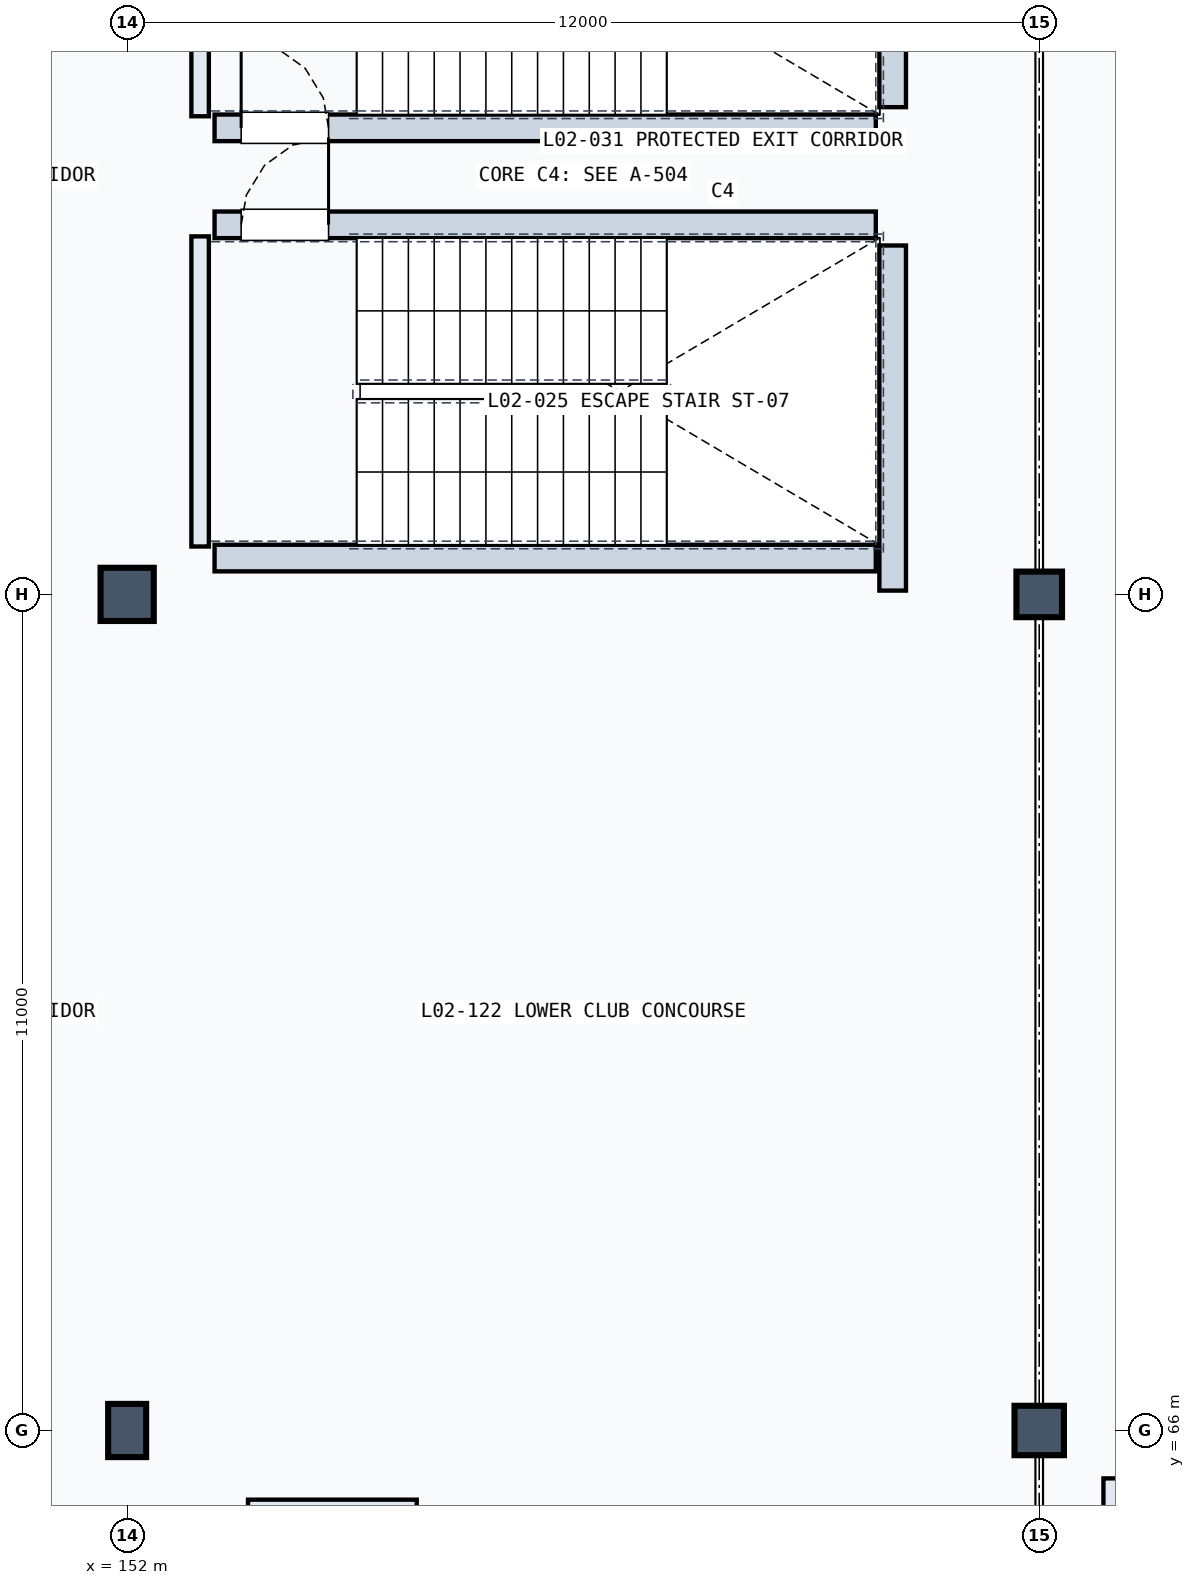
"""IFC4 building model, lengths in metres.
Left out: names, types, materials, properties, quantities, classifications, styles, units other than length and angle.
Written with IfcOpenShell. Run it as: python <this file> out.ifc"""

import sys

from ifc_helpers import new_model, si_unit, direction, frame, frame_2d, origin, origin_2d, place, context, subcontext, project, spatial, rectangle, extrude, element, fill, save


model = new_model("IFC4")
c1 = context("Model", 3, precision=1e-05, world=origin(), true_north=direction((0.0, 1.0)))
c2 = subcontext(c1, "Body", "Model", "MODEL_VIEW")
j1 = project(units=[si_unit("LENGTHUNIT", "METRE"), si_unit("PLANEANGLEUNIT", "RADIAN")], contexts=[c1])
p1 = place(None, origin())
s1 = spatial("IfcSite", under=j1, at=p1, CompositionType="ELEMENT")
p2 = place(p1, origin())
s2 = spatial("IfcBuilding", under=s1, at=p2, CompositionType="ELEMENT")
p3 = place(p2, frame((0.0, 0.0, 10.2)))
s3 = spatial("IfcBuildingStorey", under=s2, at=p3, CompositionType="ELEMENT", Elevation=10.2)
p4 = place(p3, frame((152.0, 66.0, 0.0), z_axis=(0.0, 0.0, 1.0), x_axis=(1.0, 0.0, 0.0)))
e1 = element("IfcColumn", 1, at=p4, inside=s3, PredefinedType="COLUMN", context=c2, shape_type="SweptSolid", body=[
    extrude(rectangle(XDim=0.5, YDim=0.7, at=origin_2d()), origin(), (0.0, 0.0, 1.0), 4.5),
])
p5 = place(p3, frame((152.0, 77.0, 0.0), z_axis=(0.0, 0.0, 1.0), x_axis=(1.0, 0.0, 0.0)))
e2 = element("IfcColumn", 2, at=p5, inside=s3, PredefinedType="COLUMN", context=c2, shape_type="SweptSolid", body=[
    extrude(rectangle(XDim=0.7, YDim=0.7, at=origin_2d()), origin(), (0.0, 0.0, 1.0), 4.5),
])
p6 = place(p3, frame((164.0, 66.0, 0.0), z_axis=(0.0, 0.0, 1.0), x_axis=(1.0, 0.0, 0.0)))
e3 = element("IfcColumn", 3, at=p6, inside=s3, PredefinedType="COLUMN", context=c2, shape_type="SweptSolid", body=[
    extrude(rectangle(XDim=0.65, YDim=0.65, at=origin_2d()), origin(), (0.0, 0.0, 1.0), 4.5),
])
p7 = place(p3, frame((164.0, 77.0, 0.0), z_axis=(0.0, 0.0, 1.0), x_axis=(1.0, 0.0, 0.0)))
e4 = element("IfcColumn", 4, at=p7, inside=s3, PredefinedType="COLUMN", context=c2, shape_type="SweptSolid", body=[
    extrude(rectangle(XDim=0.6, YDim=0.6, at=origin_2d()), origin(), (0.0, 0.0, 1.0), 4.5),
])
p8 = place(p3, frame((152.96, 77.63, 0.0), z_axis=(0.0, 0.0, 1.0), x_axis=(0.0, 1.0, 0.0)))
e5 = element("IfcWall", 5, at=p8, inside=s3, PredefinedType="SOLIDWALL", context=c2, shape_type="SweptSolid", body=[
    extrude(rectangle(XDim=4.08, YDim=0.23, at=frame_2d((2.04, 0.0))), origin(), (0.0, 0.0, 1.0), 4.14),
])
p9 = place(p3, frame((162.072, 77.05, 0.0), z_axis=(0.0, 0.0, 1.0), x_axis=(0.0, 1.0, 0.0)))
e6 = element("IfcWall", 6, at=p9, inside=s3, PredefinedType="SOLIDWALL", context=c2, shape_type="SweptSolid", body=[
    extrude(rectangle(XDim=4.54, YDim=0.35, at=frame_2d((2.27, 0.0))), origin(), (0.0, 0.0, 1.0), 4.14),
])
p10 = place(p3, frame((153.15, 77.478, 0.0), z_axis=(0.0, 0.0, 1.0), x_axis=(1.0, 0.0, 0.0)))
e7 = element("IfcWall", 7, at=p10, inside=s3, PredefinedType="SOLIDWALL", context=c2, shape_type="SweptSolid", body=[
    extrude(rectangle(XDim=8.7, YDim=0.35, at=frame_2d((4.35, 0.0))), origin(), (0.0, 0.0, 1.0), 4.14),
])
p11 = place(p3, frame((153.15, 81.862, 0.0), z_axis=(0.0, 0.0, 1.0), x_axis=(1.0, 0.0, 0.0)))
e8 = element("IfcWall", 8, at=p11, inside=s3, PredefinedType="SOLIDWALL", context=c2, shape_type="SweptSolid", body=[
    extrude(rectangle(XDim=8.7, YDim=0.35, at=frame_2d((4.35, 0.0))), origin(), (0.0, 0.0, 1.0), 4.14),
])
p12 = place(p11, frame((0.35, 0.0, 0.0)))
e9 = element("IfcOpeningElement", 9, at=p12, cuts=e8, PredefinedType="OPENING", context=c2, shape_type="SweptSolid", body=[
    extrude(rectangle(XDim=1.15, YDim=2.2, at=frame_2d((0.575, 1.1))), frame((0.0, 0.185, 0.0), z_axis=(0.0, -1.0, 0.0), x_axis=(1.0, 0.0, 0.0)), (0.0, 0.0, 1.0), 0.37),
])
p13 = place(p3, frame((152.96, 83.29, 0.0), z_axis=(0.0, 0.0, 1.0), x_axis=(0.0, 1.0, 0.0)))
e10 = element("IfcWall", 10, at=p13, inside=s3, PredefinedType="SOLIDWALL", context=c2, shape_type="SweptSolid", body=[
    extrude(rectangle(XDim=4.08, YDim=0.23, at=frame_2d((2.04, 0.0))), origin(), (0.0, 0.0, 1.0), 4.14),
])
p14 = place(p3, frame((162.072, 83.41, 0.0), z_axis=(0.0, 0.0, 1.0), x_axis=(0.0, 1.0, 0.0)))
e11 = element("IfcWall", 11, at=p14, inside=s3, PredefinedType="SOLIDWALL", context=c2, shape_type="SweptSolid", body=[
    extrude(rectangle(XDim=3.84, YDim=0.35, at=frame_2d((1.92, 0.0))), origin(), (0.0, 0.0, 1.0), 4.14),
])
p15 = place(p3, frame((153.15, 83.138, 0.0), z_axis=(0.0, 0.0, 1.0), x_axis=(1.0, 0.0, 0.0)))
e12 = element("IfcWall", 12, at=p15, inside=s3, PredefinedType="SOLIDWALL", context=c2, shape_type="SweptSolid", body=[
    extrude(rectangle(XDim=8.7, YDim=0.35, at=frame_2d((4.35, 0.0))), origin(), (0.0, 0.0, 1.0), 4.14),
])
p16 = place(p15, frame((0.35, 0.0, 0.0)))
e13 = element("IfcOpeningElement", 13, at=p16, cuts=e12, PredefinedType="OPENING", context=c2, shape_type="SweptSolid", body=[
    extrude(rectangle(XDim=1.15, YDim=2.2, at=frame_2d((0.575, 1.1))), frame((0.0, 0.185, 0.0), z_axis=(0.0, -1.0, 0.0), x_axis=(1.0, 0.0, 0.0)), (0.0, 0.0, 1.0), 0.37),
])
p17 = place(p3, frame((153.59, 64.96, 0.0), z_axis=(0.0, 0.0, 1.0), x_axis=(1.0, 0.0, 0.0)))
e14 = element("IfcWall", 14, at=p17, inside=s3, PredefinedType="SOLIDWALL", context=c2, shape_type="SweptSolid", body=[
    extrude(rectangle(XDim=2.22, YDim=0.26, at=frame_2d((1.11, 0.0))), origin(), (0.0, 0.0, 1.0), 4.14),
])
p18 = place(p3, frame((164.96, 61.29, 0.0), z_axis=(0.0, 0.0, 1.0), x_axis=(0.0, 1.0, 0.0)))
e15 = element("IfcWall", 15, at=p18, inside=s3, PredefinedType="SOLIDWALL", context=c2, shape_type="SweptSolid", body=[
    extrude(rectangle(XDim=4.08, YDim=0.23, at=frame_2d((2.04, 0.0))), origin(), (0.0, 0.0, 1.0), 4.14),
])
p19 = place(p12, origin())
e16 = element("IfcDoor", 16, at=p19, inside=s3, OperationType="SINGLE_SWING_RIGHT", PredefinedType="DOOR", context=c2, shape_type="SweptSolid", body=[
    extrude(rectangle(XDim=1.15, YDim=2.2, at=frame_2d((0.575, 1.1))), frame((0.0, 0.025, 0.0), z_axis=(0.0, -1.0, 0.0), x_axis=(1.0, 0.0, 0.0)), (0.0, 0.0, 1.0), 0.05),
])
fill(e9, e16)
p20 = place(p16, origin())
e17 = element("IfcDoor", 17, at=p20, inside=s3, OperationType="SINGLE_SWING_LEFT", PredefinedType="DOOR", context=c2, shape_type="SweptSolid", body=[
    extrude(rectangle(XDim=1.15, YDim=2.2, at=frame_2d((0.575, 1.1))), frame((0.0, 0.025, 0.0), z_axis=(0.0, -1.0, 0.0), x_axis=(1.0, 0.0, 0.0)), (0.0, 0.0, 1.0), 0.05),
])
fill(e13, e17)
save(model, sys.argv[1])
